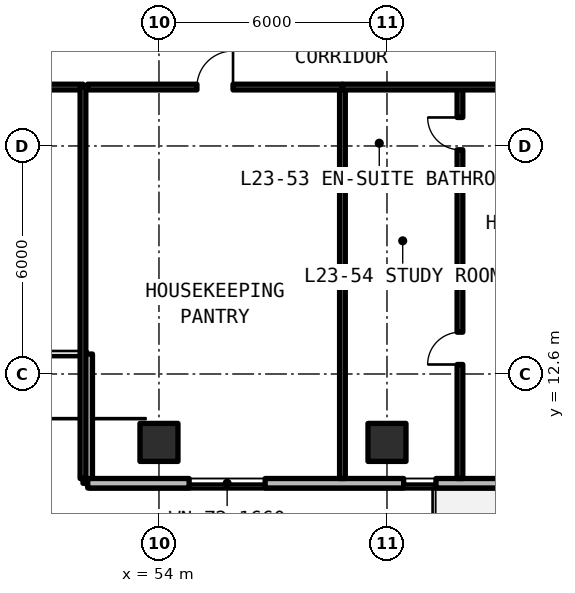
"""IFC4 building model, lengths in metres.
Left out: names, types, materials, properties, quantities, classifications, styles, units other than length and angle.
Written with IfcOpenShell. Run it as: python <this file> out.ifc"""

import sys

from ifc_helpers import new_model, si_unit, direction, frame, frame_2d, origin, origin_2d, place, context, subcontext, project, spatial, rectangle, extrude, element, fill, save


model = new_model("IFC4")
c1 = context("Model", 3, precision=1e-05, world=origin(), true_north=direction((0.0, 1.0)))
c2 = subcontext(c1, "Body", "Model", "MODEL_VIEW")
j1 = project(units=[si_unit("LENGTHUNIT", "METRE"), si_unit("PLANEANGLEUNIT", "RADIAN")], contexts=[c1])
p1 = place(None, origin())
s1 = spatial("IfcSite", under=j1, at=p1, CompositionType="ELEMENT")
p2 = place(p1, origin())
s2 = spatial("IfcBuilding", under=s1, at=p2, CompositionType="ELEMENT")
p3 = place(p2, frame((0.0, 0.0, 85.47)))
s3 = spatial("IfcBuildingStorey", under=s2, at=p3, CompositionType="ELEMENT", Elevation=85.47)
for number, where, z_axis, x_axis in (
    (1, (54.0, 10.8, 0.0), (0.0, 0.0, 1.0), (1.0, 0.0, 0.0)),
    (2, (60.0, 10.8, 0.0), (0.0, 0.0, 1.0), (1.0, 0.0, 0.0)),
):
    element("IfcColumn", number, at=place(p3, frame(where, z_axis=z_axis, x_axis=x_axis)), inside=s3, PredefinedType="COLUMN", context=c2, shape_type="SweptSolid", body=[
        extrude(rectangle(XDim=1.0, YDim=1.0, at=origin_2d()), origin(), (0.0, 0.0, 1.0), 3.3),
    ])
p4 = place(p3, frame((52.125, 13.125, 0.0), z_axis=(0.0, 0.0, 1.0), x_axis=(0.0, -1.0, 0.0)))
e3 = element("IfcWall", 3, at=p4, inside=s3, PredefinedType="SOLIDWALL", context=c2, shape_type="SweptSolid", body=[
    extrude(rectangle(XDim=3.4, YDim=0.25, at=frame_2d((1.7, 0.0))), origin(), (0.0, 0.0, 1.0), 3.08),
])
p5 = place(p3, frame((52.125, 9.725, 0.0), z_axis=(0.0, 0.0, 1.0), x_axis=(1.0, 0.0, 0.0)))
e4 = element("IfcWall", 4, at=p5, inside=s3, PredefinedType="SOLIDWALL", context=c2, shape_type="SweptSolid", body=[
    extrude(rectangle(XDim=44.023, YDim=0.25, at=frame_2d((22.012, 0.0))), origin(), (0.0, 0.0, 1.0), 3.08),
])
p6 = place(p5, frame((10.875, 0.0, 0.0)))
e5 = element("IfcOpeningElement", 5, at=p6, cuts=e4, PredefinedType="OPENING", context=c2, shape_type="SweptSolid", body=[
    extrude(rectangle(XDim=1.1, YDim=2.15, at=frame_2d((0.55, 1.075))), frame((0.0, 0.135, 0.0), z_axis=(0.0, -1.0, 0.0), x_axis=(1.0, 0.0, 0.0)), (0.0, 0.0, 1.0), 0.27),
])
p7 = place(p5, frame((22.975, 0.0, 0.0)))
e6 = element("IfcOpeningElement", 6, at=p7, cuts=e4, PredefinedType="OPENING", context=c2, shape_type="SweptSolid", body=[
    extrude(rectangle(XDim=1.1, YDim=2.15, at=frame_2d((0.55, 1.075))), frame((0.0, 0.135, 0.0), z_axis=(0.0, -1.0, 0.0), x_axis=(1.0, 0.0, 0.0)), (0.0, 0.0, 1.0), 0.27),
])
p8 = place(p5, frame((35.075, 0.0, 0.0)))
e7 = element("IfcOpeningElement", 7, at=p8, cuts=e4, PredefinedType="OPENING", context=c2, shape_type="SweptSolid", body=[
    extrude(rectangle(XDim=1.1, YDim=2.15, at=frame_2d((0.55, 1.075))), frame((0.0, 0.135, 0.0), z_axis=(0.0, -1.0, 0.0), x_axis=(1.0, 0.0, 0.0)), (0.0, 0.0, 1.0), 0.27),
])
p9 = place(p5, frame((2.669, 0.0, 0.78)))
e8 = element("IfcOpeningElement", 8, at=p9, cuts=e4, PredefinedType="OPENING", context=c2, shape_type="SweptSolid", body=[
    extrude(rectangle(XDim=2.0, YDim=1.66, at=frame_2d((1.0, 0.83))), frame((0.0, 0.135, 0.0), z_axis=(0.0, -1.0, 0.0), x_axis=(1.0, 0.0, 0.0)), (0.0, 0.0, 1.0), 0.27),
])
p10 = place(p5, frame((8.314, 0.0, 0.78)))
e9 = element("IfcOpeningElement", 9, at=p10, cuts=e4, PredefinedType="OPENING", context=c2, shape_type="SweptSolid", body=[
    extrude(rectangle(XDim=0.85, YDim=1.65, at=frame_2d((0.425, 0.825))), frame((0.0, 0.135, 0.0), z_axis=(0.0, -1.0, 0.0), x_axis=(1.0, 0.0, 0.0)), (0.0, 0.0, 1.0), 0.27),
])
p11 = place(p5, frame((27.363, 0.0, 0.78)))
e10 = element("IfcOpeningElement", 10, at=p11, cuts=e4, PredefinedType="OPENING", context=c2, shape_type="SweptSolid", body=[
    extrude(rectangle(XDim=2.0, YDim=1.66, at=frame_2d((1.0, 0.83))), frame((0.0, 0.135, 0.0), z_axis=(0.0, -1.0, 0.0), x_axis=(1.0, 0.0, 0.0)), (0.0, 0.0, 1.0), 0.27),
])
p12 = place(p5, frame((40.048, 0.0, 0.78)))
e11 = element("IfcOpeningElement", 11, at=p12, cuts=e4, PredefinedType="OPENING", context=c2, shape_type="SweptSolid", body=[
    extrude(rectangle(XDim=2.0, YDim=1.66, at=frame_2d((1.0, 0.83))), frame((0.0, 0.135, 0.0), z_axis=(0.0, -1.0, 0.0), x_axis=(1.0, 0.0, 0.0)), (0.0, 0.0, 1.0), 0.27),
])
p13 = place(p3, frame((43.6, 20.15, 0.0), z_axis=(0.0, 0.0, 1.0), x_axis=(1.0, 0.0, 0.0)))
e12 = element("IfcWall", 12, at=p13, inside=s3, PredefinedType="SOLIDWALL", context=c2, shape_type="SweptSolid", body=[
    extrude(rectangle(XDim=8.4, YDim=0.15, at=frame_2d((4.2, 0.0))), origin(), (0.0, 0.0, 1.0), 2.35),
])
p14 = place(p13, frame((3.65, 0.0, 0.0)))
e13 = element("IfcOpeningElement", 13, at=p14, cuts=e12, PredefinedType="OPENING", context=c2, shape_type="SweptSolid", body=[
    extrude(rectangle(XDim=1.1, YDim=2.15, at=frame_2d((0.55, 1.075))), frame((0.0, 0.085, 0.0), z_axis=(0.0, -1.0, 0.0), x_axis=(1.0, 0.0, 0.0)), (0.0, 0.0, 1.0), 0.17),
])
for number, where, z_axis, x_axis in (
    (14, (52.0, 9.85, 0.0), (0.0, 0.0, 1.0), (0.0, 1.0, 0.0)),
    (15, (58.828, 9.85, 0.0), (0.0, 0.0, 1.0), (0.0, 1.0, 0.0)),
):
    element("IfcWall", number, at=place(p3, frame(where, z_axis=z_axis, x_axis=x_axis)), inside=s3, PredefinedType="SOLIDWALL", context=c2, shape_type="SweptSolid", body=[
        extrude(rectangle(XDim=10.3, YDim=0.15, at=frame_2d((5.15, 0.0))), origin(), (0.0, 0.0, 1.0), 2.35),
    ])
p15 = place(p3, frame((52.12, 20.15, 0.0), z_axis=(0.0, 0.0, 1.0), x_axis=(1.0, 0.0, 0.0)))
e16 = element("IfcWall", 16, at=p15, inside=s3, PredefinedType="SOLIDWALL", context=c2, shape_type="SweptSolid", body=[
    extrude(rectangle(XDim=6.708, YDim=0.15, at=frame_2d((3.354, 0.0))), origin(), (0.0, 0.0, 1.0), 2.35),
])
p16 = place(p15, frame((2.879, 0.0, 0.0)))
e17 = element("IfcOpeningElement", 17, at=p16, cuts=e16, PredefinedType="OPENING", context=c2, shape_type="SweptSolid", body=[
    extrude(rectangle(XDim=0.95, YDim=2.15, at=frame_2d((0.475, 1.075))), frame((0.0, 0.085, 0.0), z_axis=(0.0, -1.0, 0.0), x_axis=(1.0, 0.0, 0.0)), (0.0, 0.0, 1.0), 0.17),
])
p17 = place(p3, frame((58.828, 17.7, 0.0), z_axis=(0.0, 0.0, 1.0), x_axis=(1.0, 0.0, 0.0)))
e18 = element("IfcWall", 18, at=p17, inside=s3, PredefinedType="PARTITIONING", context=c2, shape_type="SweptSolid", body=[
    extrude(rectangle(XDim=3.092, YDim=0.15, at=frame_2d((1.546, 0.0))), origin(), (0.0, 0.0, 1.0), 2.35),
])
p18 = place(p3, frame((61.92, 9.85, 0.0), z_axis=(0.0, 0.0, 1.0), x_axis=(0.0, 1.0, 0.0)))
e19 = element("IfcWall", 19, at=p18, inside=s3, PredefinedType="PARTITIONING", context=c2, shape_type="SweptSolid", body=[
    extrude(rectangle(XDim=10.3, YDim=0.15, at=frame_2d((5.15, 0.0))), origin(), (0.0, 0.0, 1.0), 2.35),
])
p19 = place(p18, frame((3.0, 0.0, 0.0)))
e20 = element("IfcOpeningElement", 20, at=p19, cuts=e19, PredefinedType="OPENING", context=c2, shape_type="SweptSolid", body=[
    extrude(rectangle(XDim=0.85, YDim=2.1, at=frame_2d((0.425, 1.05))), frame((0.0, 0.085, 0.0), z_axis=(0.0, -1.0, 0.0), x_axis=(1.0, 0.0, 0.0)), (0.0, 0.0, 1.0), 0.17),
])
p20 = place(p18, frame((8.65, 0.0, 0.0)))
e21 = element("IfcOpeningElement", 21, at=p20, cuts=e19, PredefinedType="OPENING", context=c2, shape_type="SweptSolid", body=[
    extrude(rectangle(XDim=0.85, YDim=2.1, at=frame_2d((0.425, 1.05))), frame((0.0, 0.085, 0.0), z_axis=(0.0, -1.0, 0.0), x_axis=(1.0, 0.0, 0.0)), (0.0, 0.0, 1.0), 0.17),
])
p21 = place(p3, frame((58.828, 20.15, 0.0), z_axis=(0.0, 0.0, 1.0), x_axis=(1.0, 0.0, 0.0)))
e22 = element("IfcWall", 22, at=p21, inside=s3, PredefinedType="SOLIDWALL", context=c2, shape_type="SweptSolid", body=[
    extrude(rectangle(XDim=7.826, YDim=0.15, at=frame_2d((3.913, 0.0))), origin(), (0.0, 0.0, 1.0), 2.35),
])
p22 = place(p21, frame((5.024, 0.0, 0.0)))
e23 = element("IfcOpeningElement", 23, at=p22, cuts=e22, PredefinedType="OPENING", context=c2, shape_type="SweptSolid", body=[
    extrude(rectangle(XDim=0.95, YDim=2.15, at=frame_2d((0.475, 1.075))), frame((0.0, 0.085, 0.0), z_axis=(0.0, -1.0, 0.0), x_axis=(1.0, 0.0, 0.0)), (0.0, 0.0, 1.0), 0.17),
])
p23 = place(p9, origin())
e24 = element("IfcWindow", 24, at=p23, inside=s3, PartitioningType="SINGLE_PANEL", PredefinedType="WINDOW", context=c2, shape_type="SweptSolid", body=[
    extrude(rectangle(XDim=2.0, YDim=1.66, at=frame_2d((1.0, 0.83))), frame((0.0, 0.03, 0.0), z_axis=(0.0, -1.0, 0.0), x_axis=(1.0, 0.0, 0.0)), (0.0, 0.0, 1.0), 0.06),
])
fill(e8, e24)
p24 = place(p10, origin())
e25 = element("IfcWindow", 25, at=p24, inside=s3, PartitioningType="SINGLE_PANEL", PredefinedType="WINDOW", context=c2, shape_type="SweptSolid", body=[
    extrude(rectangle(XDim=0.85, YDim=1.65, at=frame_2d((0.425, 0.825))), frame((0.0, 0.03, 0.0), z_axis=(0.0, -1.0, 0.0), x_axis=(1.0, 0.0, 0.0)), (0.0, 0.0, 1.0), 0.06),
])
fill(e9, e25)
p25 = place(p16, origin())
e26 = element("IfcDoor", 26, at=p25, inside=s3, OperationType="SINGLE_SWING_RIGHT", PredefinedType="DOOR", context=c2, shape_type="SweptSolid", body=[
    extrude(rectangle(XDim=0.95, YDim=2.15, at=frame_2d((0.475, 1.075))), frame((0.0, 0.025, 0.0), z_axis=(0.0, -1.0, 0.0), x_axis=(1.0, 0.0, 0.0)), (0.0, 0.0, 1.0), 0.05),
])
fill(e17, e26)
p26 = place(p19, origin())
e27 = element("IfcDoor", 27, at=p26, inside=s3, OperationType="SINGLE_SWING_LEFT", PredefinedType="DOOR", context=c2, shape_type="SweptSolid", body=[
    extrude(rectangle(XDim=0.85, YDim=2.1, at=frame_2d((0.425, 1.05))), frame((0.0, 0.025, 0.0), z_axis=(0.0, -1.0, 0.0), x_axis=(1.0, 0.0, 0.0)), (0.0, 0.0, 1.0), 0.05),
])
fill(e20, e27)
p27 = place(p20, origin())
e28 = element("IfcDoor", 28, at=p27, inside=s3, OperationType="SINGLE_SWING_RIGHT", PredefinedType="DOOR", context=c2, shape_type="SweptSolid", body=[
    extrude(rectangle(XDim=0.85, YDim=2.1, at=frame_2d((0.425, 1.05))), frame((0.0, 0.025, 0.0), z_axis=(0.0, -1.0, 0.0), x_axis=(1.0, 0.0, 0.0)), (0.0, 0.0, 1.0), 0.05),
])
fill(e21, e28)
save(model, sys.argv[1])
